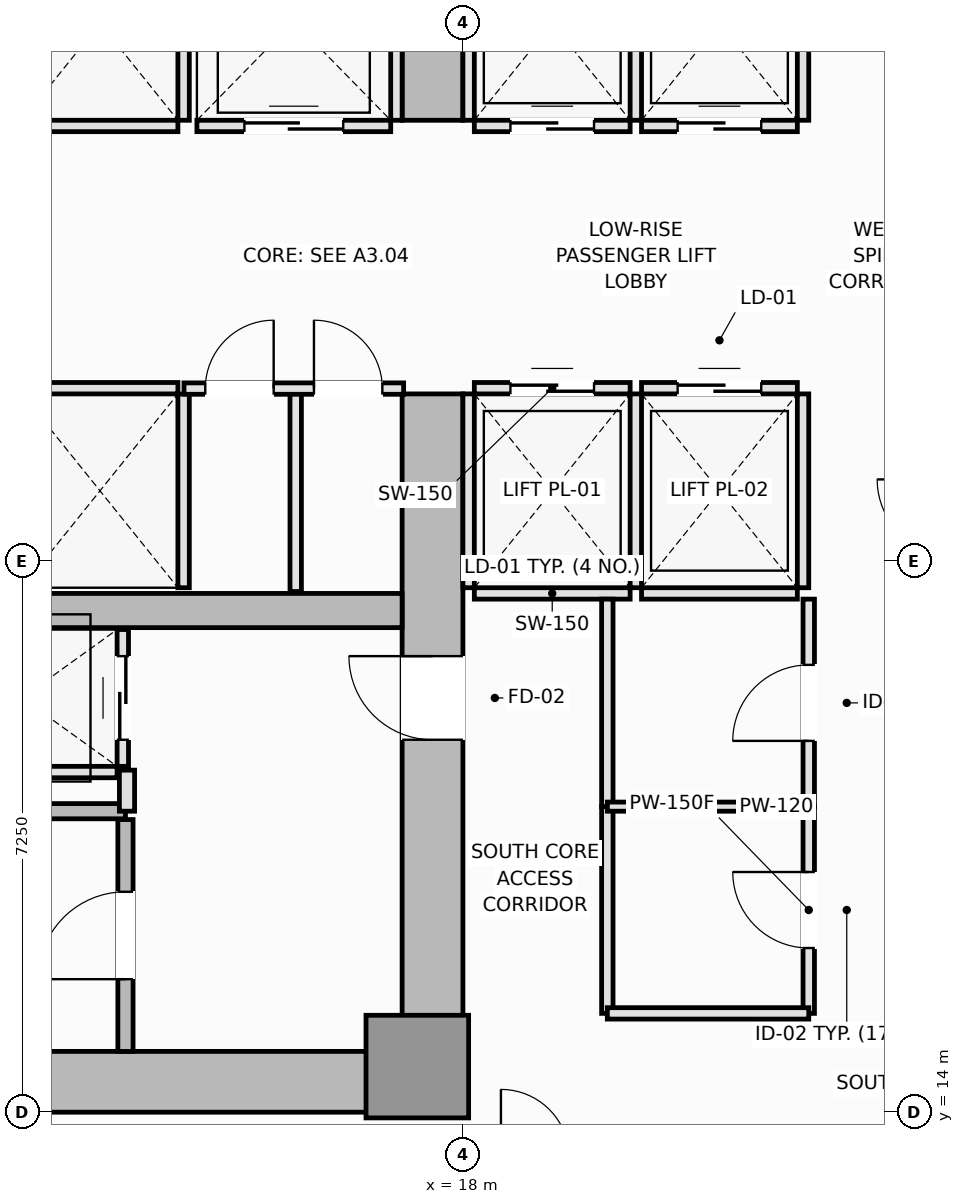
"""IFC4 building model, lengths in metres.
Left out: names, types, materials, properties, quantities, classifications, styles, units other than length and angle.
Written with IfcOpenShell. Run it as: python <this file> out.ifc"""

import sys

from ifc_helpers import new_model, si_unit, direction, frame, frame_2d, origin, origin_2d, place, context, subcontext, project, spatial, rectangle, extrude, element, fill, save


model = new_model("IFC4")
c1 = context("Model", 3, precision=1e-05, world=origin(), true_north=direction((0.0, 1.0)))
c2 = subcontext(c1, "Body", "Model", "MODEL_VIEW")
j1 = project(units=[si_unit("LENGTHUNIT", "METRE"), si_unit("PLANEANGLEUNIT", "RADIAN")], contexts=[c1])
p1 = place(None, origin())
s1 = spatial("IfcSite", under=j1, at=p1, CompositionType="ELEMENT")
p2 = place(p1, origin())
s2 = spatial("IfcBuilding", under=s1, at=p2, CompositionType="ELEMENT")
p3 = place(p2, frame((0.0, 0.0, 46.9)))
s3 = spatial("IfcBuildingStorey", under=s2, at=p3, CompositionType="ELEMENT", Elevation=46.9)
p4 = place(p3, frame((4.5, 14.4, 0.0), z_axis=(0.0, 0.0, 1.0), x_axis=(1.0, 0.0, 0.0)))
e1 = element("IfcWall", 1, at=p4, inside=s3, PredefinedType="SHEAR", context=c2, shape_type="SweptSolid", body=[
    extrude(rectangle(XDim=13.5, YDim=0.8, at=frame_2d((6.75, 0.0))), origin(), (0.0, 0.0, 1.0), 3.55),
])
p5 = place(p3, frame((17.6, 14.8, 0.0), z_axis=(0.0, 0.0, 1.0), x_axis=(0.0, 1.0, 0.0)))
e2 = element("IfcWall", 2, at=p5, inside=s3, PredefinedType="SHEAR", context=c2, shape_type="SweptSolid", body=[
    extrude(rectangle(XDim=8.65, YDim=0.8, at=frame_2d((4.325, 0.0))), origin(), (0.0, 0.0, 1.0), 3.55),
])
p6 = place(p5, frame((4.1, 0.0, 0.0)))
e3 = element("IfcOpeningElement", 3, at=p6, cuts=e2, PredefinedType="OPENING", context=c2, shape_type="SweptSolid", body=[
    extrude(rectangle(XDim=1.1, YDim=2.15, at=frame_2d((0.55, 1.075))), frame((0.0, 0.41, 0.0), z_axis=(0.0, -1.0, 0.0), x_axis=(1.0, 0.0, 0.0)), (0.0, 0.0, 1.0), 0.82),
])
p7 = place(p3, frame((17.6, 27.05, 0.0), z_axis=(0.0, 0.0, 1.0), x_axis=(0.0, 1.0, 0.0)))
e4 = element("IfcWall", 4, at=p7, inside=s3, PredefinedType="SHEAR", context=c2, shape_type="SweptSolid", body=[
    extrude(rectangle(XDim=8.65, YDim=0.8, at=frame_2d((4.325, 0.0))), origin(), (0.0, 0.0, 1.0), 3.55),
])
p8 = place(p7, frame((3.45, 0.0, 0.0)))
e5 = element("IfcOpeningElement", 5, at=p8, cuts=e4, PredefinedType="OPENING", context=c2, shape_type="SweptSolid", body=[
    extrude(rectangle(XDim=1.1, YDim=2.15, at=frame_2d((0.55, 1.075))), frame((0.0, 0.41, 0.0), z_axis=(0.0, -1.0, 0.0), x_axis=(1.0, 0.0, 0.0)), (0.0, 0.0, 1.0), 0.82),
])
p9 = place(p3, frame((5.3, 20.6, 0.0), z_axis=(0.0, 0.0, 1.0), x_axis=(1.0, 0.0, 0.0)))
e6 = element("IfcWall", 6, at=p9, inside=s3, PredefinedType="SHEAR", context=c2, shape_type="SweptSolid", body=[
    extrude(rectangle(XDim=11.9, YDim=0.45, at=frame_2d((5.95, 0.0))), origin(), (0.0, 0.0, 1.0), 3.55),
])
p10 = place(p3, frame((17.4, 14.6, 0.0), z_axis=(0.0, 0.0, 1.0), x_axis=(1.0, 0.0, 0.0)))
e7 = element("IfcColumn", 7, at=p10, inside=s3, PredefinedType="PILASTER", context=c2, shape_type="SweptSolid", body=[
    extrude(rectangle(XDim=1.35, YDim=1.35, at=origin_2d()), origin(), (0.0, 0.0, 1.0), 3.55),
])
p11 = place(p3, frame((5.9, 17.96, 0.0), z_axis=(0.0, 0.0, 1.0), x_axis=(1.0, 0.0, 0.0)))
e8 = element("IfcWall", 8, at=p11, inside=s3, PredefinedType="SOLIDWALL", context=c2, shape_type="SweptSolid", body=[
    extrude(rectangle(XDim=7.66, YDim=0.2, at=frame_2d((3.83, 0.0))), origin(), (0.0, 0.0, 1.0), 3.55),
])
p12 = place(p3, frame((13.56, 14.8, 0.0), z_axis=(0.0, 0.0, 1.0), x_axis=(0.0, 1.0, 0.0)))
e9 = element("IfcWall", 9, at=p12, inside=s3, PredefinedType="SOLIDWALL", context=c2, shape_type="SweptSolid", body=[
    extrude(rectangle(XDim=3.05, YDim=0.2, at=frame_2d((1.525, 0.0))), origin(), (0.0, 0.0, 1.0), 3.55),
])
p13 = place(p12, frame((0.95, 0.0, 0.0)))
e10 = element("IfcOpeningElement", 10, at=p13, cuts=e9, PredefinedType="OPENING", context=c2, shape_type="SweptSolid", body=[
    extrude(rectangle(XDim=1.15, YDim=2.15, at=frame_2d((0.575, 1.075))), frame((0.0, 0.11, 0.0), z_axis=(0.0, -1.0, 0.0), x_axis=(1.0, 0.0, 0.0)), (0.0, 0.0, 1.0), 0.22),
])
p14 = place(p3, frame((18.15, 20.825, 0.0), z_axis=(0.0, 0.0, 1.0), x_axis=(1.0, 0.0, 0.0)))
e11 = element("IfcWall", 11, at=p14, inside=s3, PredefinedType="PARTITIONING", context=c2, shape_type="SweptSolid", body=[
    extrude(rectangle(XDim=2.05, YDim=0.15, at=frame_2d((1.025, 0.0))), origin(), (0.0, 0.0, 1.0), 3.37),
])
p15 = place(p3, frame((18.15, 23.525, 0.0), z_axis=(0.0, 0.0, 1.0), x_axis=(1.0, 0.0, 0.0)))
e12 = element("IfcWall", 12, at=p15, inside=s3, PredefinedType="PARTITIONING", context=c2, shape_type="SweptSolid", body=[
    extrude(rectangle(XDim=2.05, YDim=0.15, at=frame_2d((1.025, 0.0))), origin(), (0.0, 0.0, 1.0), 3.37),
])
p16 = place(p15, frame((0.475, 0.0, 0.0)))
e13 = element("IfcOpeningElement", 13, at=p16, cuts=e12, PredefinedType="OPENING", context=c2, shape_type="SweptSolid", body=[
    extrude(rectangle(XDim=1.1, YDim=2.2, at=frame_2d((0.55, 1.1))), frame((0.0, 0.085, 0.0), z_axis=(0.0, -1.0, 0.0), x_axis=(1.0, 0.0, 0.0)), (0.0, 0.0, 1.0), 0.17),
])
for number, where, z_axis, x_axis in (
    (14, (18.075, 20.9, 0.0), (0.0, 0.0, 1.0), (0.0, 1.0, 0.0)),
    (15, (20.275, 20.9, 0.0), (0.0, 0.0, 1.0), (0.0, 1.0, 0.0)),
):
    element("IfcWall", number, at=place(p3, frame(where, z_axis=z_axis, x_axis=x_axis)), inside=s3, PredefinedType="PARTITIONING", context=c2, shape_type="SweptSolid", body=[
        extrude(rectangle(XDim=2.55, YDim=0.15, at=frame_2d((1.275, 0.0))), origin(), (0.0, 0.0, 1.0), 3.37),
    ])
p17 = place(p3, frame((20.35, 20.825, 0.0), z_axis=(0.0, 0.0, 1.0), x_axis=(1.0, 0.0, 0.0)))
e16 = element("IfcWall", 16, at=p17, inside=s3, PredefinedType="PARTITIONING", context=c2, shape_type="SweptSolid", body=[
    extrude(rectangle(XDim=2.05, YDim=0.15, at=frame_2d((1.025, 0.0))), origin(), (0.0, 0.0, 1.0), 3.37),
])
p18 = place(p3, frame((20.35, 23.525, 0.0), z_axis=(0.0, 0.0, 1.0), x_axis=(1.0, 0.0, 0.0)))
e17 = element("IfcWall", 17, at=p18, inside=s3, PredefinedType="PARTITIONING", context=c2, shape_type="SweptSolid", body=[
    extrude(rectangle(XDim=2.05, YDim=0.15, at=frame_2d((1.025, 0.0))), origin(), (0.0, 0.0, 1.0), 3.37),
])
p19 = place(p18, frame((0.475, 0.0, 0.0)))
e18 = element("IfcOpeningElement", 18, at=p19, cuts=e17, PredefinedType="OPENING", context=c2, shape_type="SweptSolid", body=[
    extrude(rectangle(XDim=1.1, YDim=2.2, at=frame_2d((0.55, 1.1))), frame((0.0, 0.085, 0.0), z_axis=(0.0, -1.0, 0.0), x_axis=(1.0, 0.0, 0.0)), (0.0, 0.0, 1.0), 0.17),
])
p20 = place(p3, frame((22.475, 20.9, 0.0), z_axis=(0.0, 0.0, 1.0), x_axis=(0.0, 1.0, 0.0)))
e19 = element("IfcWall", 19, at=p20, inside=s3, PredefinedType="PARTITIONING", context=c2, shape_type="SweptSolid", body=[
    extrude(rectangle(XDim=2.55, YDim=0.15, at=frame_2d((1.275, 0.0))), origin(), (0.0, 0.0, 1.0), 3.37),
])
p21 = place(p3, frame((18.15, 26.975, 0.0), z_axis=(0.0, 0.0, 1.0), x_axis=(1.0, 0.0, 0.0)))
e20 = element("IfcWall", 20, at=p21, inside=s3, PredefinedType="PARTITIONING", context=c2, shape_type="SweptSolid", body=[
    extrude(rectangle(XDim=2.05, YDim=0.15, at=frame_2d((1.025, 0.0))), origin(), (0.0, 0.0, 1.0), 3.37),
])
p22 = place(p21, frame((0.475, 0.0, 0.0)))
e21 = element("IfcOpeningElement", 21, at=p22, cuts=e20, PredefinedType="OPENING", context=c2, shape_type="SweptSolid", body=[
    extrude(rectangle(XDim=1.1, YDim=2.2, at=frame_2d((0.55, 1.1))), frame((0.0, 0.085, 0.0), z_axis=(0.0, -1.0, 0.0), x_axis=(1.0, 0.0, 0.0)), (0.0, 0.0, 1.0), 0.17),
])
for number, where, z_axis, x_axis in (
    (22, (18.075, 27.05, 0.0), (0.0, 0.0, 1.0), (0.0, 1.0, 0.0)),
    (23, (20.275, 27.05, 0.0), (0.0, 0.0, 1.0), (0.0, 1.0, 0.0)),
):
    element("IfcWall", number, at=place(p3, frame(where, z_axis=z_axis, x_axis=x_axis)), inside=s3, PredefinedType="PARTITIONING", context=c2, shape_type="SweptSolid", body=[
        extrude(rectangle(XDim=2.55, YDim=0.15, at=frame_2d((1.275, 0.0))), origin(), (0.0, 0.0, 1.0), 3.37),
    ])
p23 = place(p3, frame((20.35, 26.975, 0.0), z_axis=(0.0, 0.0, 1.0), x_axis=(1.0, 0.0, 0.0)))
e24 = element("IfcWall", 24, at=p23, inside=s3, PredefinedType="PARTITIONING", context=c2, shape_type="SweptSolid", body=[
    extrude(rectangle(XDim=2.05, YDim=0.15, at=frame_2d((1.025, 0.0))), origin(), (0.0, 0.0, 1.0), 3.37),
])
p24 = place(p23, frame((0.475, 0.0, 0.0)))
e25 = element("IfcOpeningElement", 25, at=p24, cuts=e24, PredefinedType="OPENING", context=c2, shape_type="SweptSolid", body=[
    extrude(rectangle(XDim=1.1, YDim=2.2, at=frame_2d((0.55, 1.1))), frame((0.0, 0.085, 0.0), z_axis=(0.0, -1.0, 0.0), x_axis=(1.0, 0.0, 0.0)), (0.0, 0.0, 1.0), 0.17),
])
p25 = place(p3, frame((22.475, 27.05, 0.0), z_axis=(0.0, 0.0, 1.0), x_axis=(0.0, 1.0, 0.0)))
e26 = element("IfcWall", 26, at=p25, inside=s3, PredefinedType="PARTITIONING", context=c2, shape_type="SweptSolid", body=[
    extrude(rectangle(XDim=2.55, YDim=0.15, at=frame_2d((1.275, 0.0))), origin(), (0.0, 0.0, 1.0), 3.37),
])
p26 = place(p3, frame((12.2, 23.525, 0.0), z_axis=(0.0, 0.0, 1.0), x_axis=(1.0, 0.0, 0.0)))
e27 = element("IfcWall", 27, at=p26, inside=s3, PredefinedType="PARTITIONING", context=c2, shape_type="SweptSolid", body=[
    extrude(rectangle(XDim=2.05, YDim=0.15, at=frame_2d((1.025, 0.0))), origin(), (0.0, 0.0, 1.0), 3.37),
])
p27 = place(p3, frame((14.325, 20.9, 0.0), z_axis=(0.0, 0.0, 1.0), x_axis=(0.0, 1.0, 0.0)))
e28 = element("IfcWall", 28, at=p27, inside=s3, PredefinedType="PARTITIONING", context=c2, shape_type="SweptSolid", body=[
    extrude(rectangle(XDim=2.55, YDim=0.15, at=frame_2d((1.275, 0.0))), origin(), (0.0, 0.0, 1.0), 3.37),
])
p28 = place(p3, frame((12.2, 26.975, 0.0), z_axis=(0.0, 0.0, 1.0), x_axis=(1.0, 0.0, 0.0)))
e29 = element("IfcWall", 29, at=p28, inside=s3, PredefinedType="PARTITIONING", context=c2, shape_type="SweptSolid", body=[
    extrude(rectangle(XDim=2.05, YDim=0.15, at=frame_2d((1.025, 0.0))), origin(), (0.0, 0.0, 1.0), 3.37),
])
p29 = place(p3, frame((14.325, 27.05, 0.0), z_axis=(0.0, 0.0, 1.0), x_axis=(0.0, 1.0, 0.0)))
e30 = element("IfcWall", 30, at=p29, inside=s3, PredefinedType="PARTITIONING", context=c2, shape_type="SweptSolid", body=[
    extrude(rectangle(XDim=2.55, YDim=0.15, at=frame_2d((1.275, 0.0))), origin(), (0.0, 0.0, 1.0), 3.37),
])
p30 = place(p3, frame((14.5, 26.975, 0.0), z_axis=(0.0, 0.0, 1.0), x_axis=(1.0, 0.0, 0.0)))
e31 = element("IfcWall", 31, at=p30, inside=s3, PredefinedType="PARTITIONING", context=c2, shape_type="SweptSolid", body=[
    extrude(rectangle(XDim=2.55, YDim=0.15, at=frame_2d((1.275, 0.0))), origin(), (0.0, 0.0, 1.0), 3.37),
])
p31 = place(p30, frame((0.625, 0.0, 0.0)))
e32 = element("IfcOpeningElement", 32, at=p31, cuts=e31, PredefinedType="OPENING", context=c2, shape_type="SweptSolid", body=[
    extrude(rectangle(XDim=1.3, YDim=2.2, at=frame_2d((0.65, 1.1))), frame((0.0, 0.085, 0.0), z_axis=(0.0, -1.0, 0.0), x_axis=(1.0, 0.0, 0.0)), (0.0, 0.0, 1.0), 0.17),
])
p32 = place(p3, frame((17.125, 27.05, 0.0), z_axis=(0.0, 0.0, 1.0), x_axis=(0.0, 1.0, 0.0)))
e33 = element("IfcWall", 33, at=p32, inside=s3, PredefinedType="PARTITIONING", context=c2, shape_type="SweptSolid", body=[
    extrude(rectangle(XDim=2.6, YDim=0.15, at=frame_2d((1.3, 0.0))), origin(), (0.0, 0.0, 1.0), 3.37),
])
p33 = place(p3, frame((10.95, 18.475, 0.0), z_axis=(0.0, 0.0, 1.0), x_axis=(1.0, 0.0, 0.0)))
e34 = element("IfcWall", 34, at=p33, inside=s3, PredefinedType="PARTITIONING", context=c2, shape_type="SweptSolid", body=[
    extrude(rectangle(XDim=2.5, YDim=0.15, at=frame_2d((1.25, 0.0))), origin(), (0.0, 0.0, 1.0), 3.37),
])
p34 = place(p3, frame((13.525, 18.55, 0.0), z_axis=(0.0, 0.0, 1.0), x_axis=(0.0, 1.0, 0.0)))
e35 = element("IfcWall", 35, at=p34, inside=s3, PredefinedType="PARTITIONING", context=c2, shape_type="SweptSolid", body=[
    extrude(rectangle(XDim=1.8, YDim=0.15, at=frame_2d((0.9, 0.0))), origin(), (0.0, 0.0, 1.0), 3.37),
])
p35 = place(p34, frame((0.35, 0.0, 0.0)))
e36 = element("IfcOpeningElement", 36, at=p35, cuts=e35, PredefinedType="OPENING", context=c2, shape_type="SweptSolid", body=[
    extrude(rectangle(XDim=1.1, YDim=2.2, at=frame_2d((0.55, 1.1))), frame((0.0, 0.085, 0.0), z_axis=(0.0, -1.0, 0.0), x_axis=(1.0, 0.0, 0.0)), (0.0, 0.0, 1.0), 0.17),
])
p36 = place(p3, frame((13.58, 17.96, 0.0), z_axis=(0.0, 0.0, 1.0), x_axis=(0.0, 1.0, 0.0)))
e37 = element("IfcWall", 37, at=p36, inside=s3, PredefinedType="PARTITIONING", context=c2, shape_type="SweptSolid", body=[
    extrude(rectangle(XDim=0.54, YDim=0.2, at=frame_2d((0.27, 0.0))), origin(), (0.0, 0.0, 1.0), 3.37),
])
p37 = place(p3, frame((15.8, 20.85, 0.0), z_axis=(0.0, 0.0, 1.0), x_axis=(0.0, 1.0, 0.0)))
e38 = element("IfcWall", 38, at=p37, inside=s3, PredefinedType="PARTITIONING", context=c2, shape_type="SweptSolid", body=[
    extrude(rectangle(XDim=2.67, YDim=0.15, at=frame_2d((1.335, 0.0))), origin(), (0.0, 0.0, 1.0), 3.37),
])
p38 = place(p3, frame((14.33, 23.52, 0.0), z_axis=(0.0, 0.0, 1.0), x_axis=(1.0, 0.0, 0.0)))
e39 = element("IfcWall", 39, at=p38, inside=s3, PredefinedType="PARTITIONING", context=c2, shape_type="SweptSolid", body=[
    extrude(rectangle(XDim=2.89, YDim=0.15, at=frame_2d((1.445, 0.0))), origin(), (0.0, 0.0, 1.0), 3.37),
])
p39 = place(p38, frame((0.28, 0.0, 0.0)))
e40 = element("IfcOpeningElement", 40, at=p39, cuts=e39, PredefinedType="OPENING", context=c2, shape_type="SweptSolid", body=[
    extrude(rectangle(XDim=0.9, YDim=2.1, at=frame_2d((0.45, 1.05))), frame((0.0, 0.085, 0.0), z_axis=(0.0, -1.0, 0.0), x_axis=(1.0, 0.0, 0.0)), (0.0, 0.0, 1.0), 0.17),
])
p40 = place(p38, frame((1.71, 0.0, 0.0)))
e41 = element("IfcOpeningElement", 41, at=p40, cuts=e39, PredefinedType="OPENING", context=c2, shape_type="SweptSolid", body=[
    extrude(rectangle(XDim=0.9, YDim=2.1, at=frame_2d((0.45, 1.05))), frame((0.0, 0.085, 0.0), z_axis=(0.0, -1.0, 0.0), x_axis=(1.0, 0.0, 0.0)), (0.0, 0.0, 1.0), 0.17),
])
p41 = place(p3, frame((22.55, 15.3, 0.0), z_axis=(0.0, 0.0, 1.0), x_axis=(0.0, 1.0, 0.0)))
e42 = element("IfcWall", 42, at=p41, inside=s3, PredefinedType="PARTITIONING", context=c2, shape_type="SweptSolid", body=[
    extrude(rectangle(XDim=2.72, YDim=0.15, at=frame_2d((1.36, 0.0))), origin(), (0.0, 0.0, 1.0), 3.01),
])
p42 = place(p41, frame((0.86, 0.0, 0.0)))
e43 = element("IfcOpeningElement", 43, at=p42, cuts=e42, PredefinedType="OPENING", context=c2, shape_type="SweptSolid", body=[
    extrude(rectangle(XDim=1.0, YDim=2.15, at=frame_2d((0.5, 1.075))), frame((0.0, 0.085, 0.0), z_axis=(0.0, -1.0, 0.0), x_axis=(1.0, 0.0, 0.0)), (0.0, 0.0, 1.0), 0.17),
])
p43 = place(p3, frame((22.55, 18.02, 0.0), z_axis=(0.0, 0.0, 1.0), x_axis=(0.0, 1.0, 0.0)))
e44 = element("IfcWall", 44, at=p43, inside=s3, PredefinedType="PARTITIONING", context=c2, shape_type="SweptSolid", body=[
    extrude(rectangle(XDim=2.73, YDim=0.15, at=frame_2d((1.365, 0.0))), origin(), (0.0, 0.0, 1.0), 3.01),
])
p44 = place(p43, frame((0.865, 0.0, 0.0)))
e45 = element("IfcOpeningElement", 45, at=p44, cuts=e44, PredefinedType="OPENING", context=c2, shape_type="SweptSolid", body=[
    extrude(rectangle(XDim=1.0, YDim=2.15, at=frame_2d((0.5, 1.075))), frame((0.0, 0.085, 0.0), z_axis=(0.0, -1.0, 0.0), x_axis=(1.0, 0.0, 0.0)), (0.0, 0.0, 1.0), 0.17),
])
p45 = place(p3, frame((19.9, 15.3, 0.0), z_axis=(0.0, 0.0, 1.0), x_axis=(0.0, 1.0, 0.0)))
e46 = element("IfcWall", 46, at=p45, inside=s3, PredefinedType="PARTITIONING", context=c2, shape_type="SweptSolid", body=[
    extrude(rectangle(XDim=2.72, YDim=0.15, at=frame_2d((1.36, 0.0))), origin(), (0.0, 0.0, 1.0), 3.37),
])
p46 = place(p3, frame((19.9, 18.02, 0.0), z_axis=(0.0, 0.0, 1.0), x_axis=(0.0, 1.0, 0.0)))
e47 = element("IfcWall", 47, at=p46, inside=s3, PredefinedType="PARTITIONING", context=c2, shape_type="SweptSolid", body=[
    extrude(rectangle(XDim=2.73, YDim=0.15, at=frame_2d((1.365, 0.0))), origin(), (0.0, 0.0, 1.0), 3.37),
])
p47 = place(p3, frame((19.9, 15.3, 0.0), z_axis=(0.0, 0.0, 1.0), x_axis=(1.0, 0.0, 0.0)))
e48 = element("IfcWall", 48, at=p47, inside=s3, PredefinedType="PARTITIONING", context=c2, shape_type="SweptSolid", body=[
    extrude(rectangle(XDim=2.65, YDim=0.15, at=frame_2d((1.325, 0.0))), origin(), (0.0, 0.0, 1.0), 3.37),
])
p48 = place(p3, frame((19.9, 18.02, 0.0), z_axis=(0.0, 0.0, 1.0), x_axis=(1.0, 0.0, 0.0)))
e49 = element("IfcWall", 49, at=p48, inside=s3, PredefinedType="PARTITIONING", context=c2, shape_type="SweptSolid", body=[
    extrude(rectangle(XDim=2.65, YDim=0.12, at=frame_2d((1.325, 0.0))), origin(), (0.0, 0.0, 1.0), 3.37),
])
p49 = place(p13, origin())
e50 = element("IfcDoor", 50, at=p49, inside=s3, OperationType="SINGLE_SWING_LEFT", PredefinedType="DOOR", context=c2, shape_type="SweptSolid", body=[
    extrude(rectangle(XDim=1.15, YDim=2.15, at=frame_2d((0.575, 1.075))), frame((0.0, 0.025, 0.0), z_axis=(0.0, -1.0, 0.0), x_axis=(1.0, 0.0, 0.0)), (0.0, 0.0, 1.0), 0.05),
])
fill(e10, e50)
p50 = place(p16, origin())
e51 = element("IfcDoor", 51, at=p50, inside=s3, OperationType="DOUBLE_DOOR_SLIDING", PredefinedType="DOOR", context=c2, shape_type="SweptSolid", body=[
    extrude(rectangle(XDim=1.1, YDim=2.2, at=frame_2d((0.55, 1.1))), frame((0.0, 0.025, 0.0), z_axis=(0.0, -1.0, 0.0), x_axis=(1.0, 0.0, 0.0)), (0.0, 0.0, 1.0), 0.05),
])
fill(e13, e51)
p51 = place(p19, origin())
e52 = element("IfcDoor", 52, at=p51, inside=s3, OperationType="DOUBLE_DOOR_SLIDING", PredefinedType="DOOR", context=c2, shape_type="SweptSolid", body=[
    extrude(rectangle(XDim=1.1, YDim=2.2, at=frame_2d((0.55, 1.1))), frame((0.0, 0.025, 0.0), z_axis=(0.0, -1.0, 0.0), x_axis=(1.0, 0.0, 0.0)), (0.0, 0.0, 1.0), 0.05),
])
fill(e18, e52)
p52 = place(p22, origin())
e53 = element("IfcDoor", 53, at=p52, inside=s3, OperationType="DOUBLE_DOOR_SLIDING", PredefinedType="DOOR", context=c2, shape_type="SweptSolid", body=[
    extrude(rectangle(XDim=1.1, YDim=2.2, at=frame_2d((0.55, 1.1))), frame((0.0, 0.025, 0.0), z_axis=(0.0, -1.0, 0.0), x_axis=(1.0, 0.0, 0.0)), (0.0, 0.0, 1.0), 0.05),
])
fill(e21, e53)
p53 = place(p24, origin())
e54 = element("IfcDoor", 54, at=p53, inside=s3, OperationType="DOUBLE_DOOR_SLIDING", PredefinedType="DOOR", context=c2, shape_type="SweptSolid", body=[
    extrude(rectangle(XDim=1.1, YDim=2.2, at=frame_2d((0.55, 1.1))), frame((0.0, 0.025, 0.0), z_axis=(0.0, -1.0, 0.0), x_axis=(1.0, 0.0, 0.0)), (0.0, 0.0, 1.0), 0.05),
])
fill(e25, e54)
p54 = place(p31, origin())
e55 = element("IfcDoor", 55, at=p54, inside=s3, OperationType="DOUBLE_DOOR_SLIDING", PredefinedType="DOOR", context=c2, shape_type="SweptSolid", body=[
    extrude(rectangle(XDim=1.3, YDim=2.2, at=frame_2d((0.65, 1.1))), frame((0.0, 0.025, 0.0), z_axis=(0.0, -1.0, 0.0), x_axis=(1.0, 0.0, 0.0)), (0.0, 0.0, 1.0), 0.05),
])
fill(e32, e55)
p55 = place(p35, origin())
e56 = element("IfcDoor", 56, at=p55, inside=s3, OperationType="DOUBLE_DOOR_SLIDING", PredefinedType="DOOR", context=c2, shape_type="SweptSolid", body=[
    extrude(rectangle(XDim=1.1, YDim=2.2, at=frame_2d((0.55, 1.1))), frame((0.0, 0.025, 0.0), z_axis=(0.0, -1.0, 0.0), x_axis=(1.0, 0.0, 0.0)), (0.0, 0.0, 1.0), 0.05),
])
fill(e36, e56)
p56 = place(p6, origin())
e57 = element("IfcDoor", 57, at=p56, inside=s3, OperationType="SINGLE_SWING_RIGHT", PredefinedType="DOOR", context=c2, shape_type="SweptSolid", body=[
    extrude(rectangle(XDim=1.1, YDim=2.15, at=frame_2d((0.55, 1.075))), frame((0.0, 0.025, 0.0), z_axis=(0.0, -1.0, 0.0), x_axis=(1.0, 0.0, 0.0)), (0.0, 0.0, 1.0), 0.05),
])
fill(e3, e57)
p57 = place(p39, origin())
e58 = element("IfcDoor", 58, at=p57, inside=s3, OperationType="SINGLE_SWING_RIGHT", PredefinedType="DOOR", context=c2, shape_type="SweptSolid", body=[
    extrude(rectangle(XDim=0.9, YDim=2.1, at=frame_2d((0.45, 1.05))), frame((0.0, 0.025, 0.0), z_axis=(0.0, -1.0, 0.0), x_axis=(1.0, 0.0, 0.0)), (0.0, 0.0, 1.0), 0.05),
])
fill(e40, e58)
p58 = place(p40, origin())
e59 = element("IfcDoor", 59, at=p58, inside=s3, OperationType="SINGLE_SWING_LEFT", PredefinedType="DOOR", context=c2, shape_type="SweptSolid", body=[
    extrude(rectangle(XDim=0.9, YDim=2.1, at=frame_2d((0.45, 1.05))), frame((0.0, 0.025, 0.0), z_axis=(0.0, -1.0, 0.0), x_axis=(1.0, 0.0, 0.0)), (0.0, 0.0, 1.0), 0.05),
])
fill(e41, e59)
p59 = place(p42, origin())
e60 = element("IfcDoor", 60, at=p59, inside=s3, OperationType="SINGLE_SWING_RIGHT", PredefinedType="DOOR", context=c2, shape_type="SweptSolid", body=[
    extrude(rectangle(XDim=1.0, YDim=2.15, at=frame_2d((0.5, 1.075))), frame((0.0, 0.025, 0.0), z_axis=(0.0, -1.0, 0.0), x_axis=(1.0, 0.0, 0.0)), (0.0, 0.0, 1.0), 0.05),
])
fill(e43, e60)
p60 = place(p44, origin())
e61 = element("IfcDoor", 61, at=p60, inside=s3, OperationType="SINGLE_SWING_LEFT", PredefinedType="DOOR", context=c2, shape_type="SweptSolid", body=[
    extrude(rectangle(XDim=1.0, YDim=2.15, at=frame_2d((0.5, 1.075))), frame((0.0, 0.025, 0.0), z_axis=(0.0, -1.0, 0.0), x_axis=(1.0, 0.0, 0.0)), (0.0, 0.0, 1.0), 0.05),
])
fill(e45, e61)
save(model, sys.argv[1])
